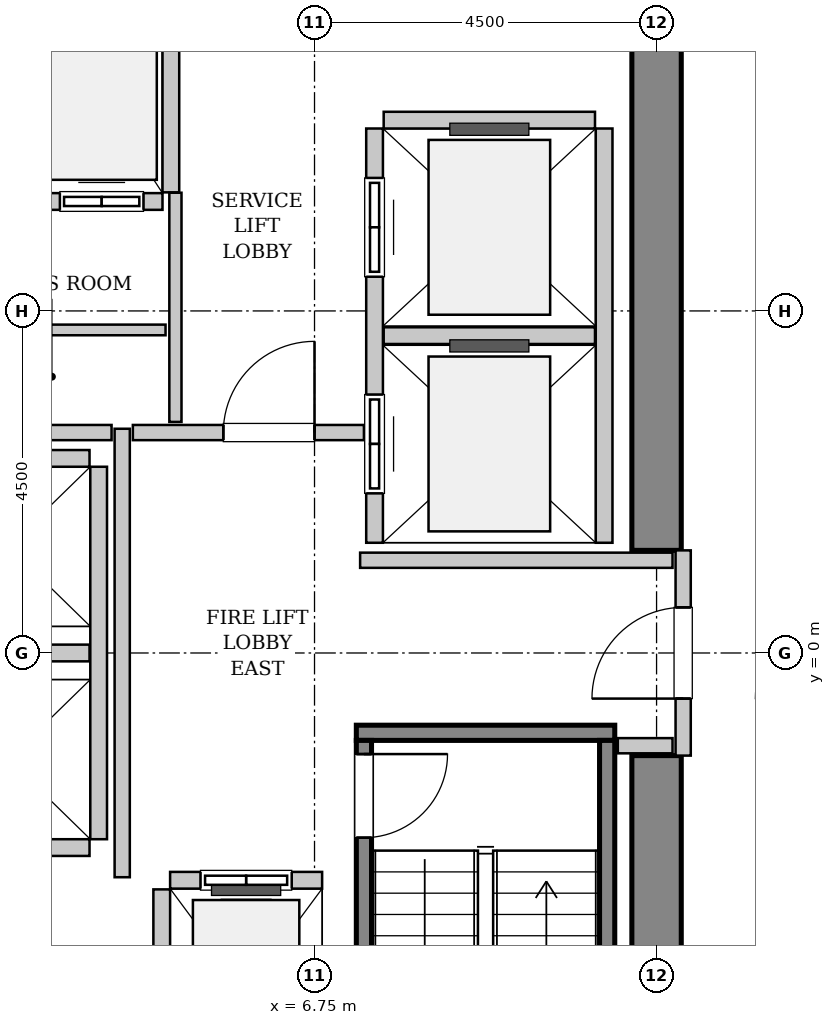
"""IFC4 building model, lengths in metres.
Left out: names, types, materials, properties, quantities, classifications, styles, units other than length and angle.
Written with IfcOpenShell. Run it as: python <this file> out.ifc"""

import sys

from ifc_helpers import new_model, si_unit, direction, frame, frame_2d, origin, place, context, subcontext, project, spatial, rectangle, extrude, source, transform, mapped, element, fill, save


model = new_model("IFC4")
c1 = context("Model", 3, precision=1e-05, world=origin(), true_north=direction((0.0, 1.0)))
c2 = subcontext(c1, "Body", "Model", "MODEL_VIEW")
j1 = project(units=[si_unit("LENGTHUNIT", "METRE"), si_unit("PLANEANGLEUNIT", "RADIAN")], contexts=[c1])
p1 = place(None, origin())
s1 = spatial("IfcSite", under=j1, at=p1, CompositionType="ELEMENT")
p2 = place(p1, origin())
s2 = spatial("IfcBuilding", under=s1, at=p2, CompositionType="ELEMENT")
p3 = place(p2, frame((0.0, 0.0, 86.2)))
s3 = spatial("IfcBuildingStorey", under=s2, at=p3, CompositionType="ELEMENT", Elevation=86.2)
m1 = source(origin(), c2, "Body", "SweptSolid", [
    extrude(rectangle(XDim=7.325, YDim=0.65, at=frame_2d((3.663, 0.0))), origin(), (0.0, 0.0, 1.0), 4.6),
])
for number, where, z_axis, x_axis in (
    (1, (11.25, -8.675, 0.0), (0.0, 0.0, 1.0), (0.0, 1.0, 0.0)),
    (2, (11.25, 1.35, 0.0), (0.0, 0.0, 1.0), (0.0, 1.0, 0.0)),
):
    element("IfcWall", number, at=place(p3, frame(where, z_axis=z_axis, x_axis=x_axis)), inside=s3, PredefinedType="SHEAR", context=c2, shape_type="MappedRepresentation", body=[
        mapped(m1, transform((0.0, 0.0, 0.0), x_axis=(1.0, 0.0, 0.0), y_axis=(0.0, 1.0, 0.0), z_axis=(0.0, 0.0, 1.0), scale=1.0)),
    ])
m2 = source(origin(), c2, "Body", "SweptSolid", [
    extrude(rectangle(XDim=3.4, YDim=0.2, at=frame_2d((1.7, 0.0))), origin(), (0.0, 0.0, 1.0), 4.6),
])
p4 = place(p3, frame((7.3, -1.05, 0.0), z_axis=(0.0, 0.0, 1.0), x_axis=(1.0, 0.0, 0.0)))
e3 = element("IfcWall", 3, at=p4, inside=s3, PredefinedType="SOLIDWALL", context=c2, shape_type="MappedRepresentation", body=[
    mapped(m2, transform((0.0, 0.0, 0.0), x_axis=(1.0, 0.0, 0.0), y_axis=(0.0, 1.0, 0.0), z_axis=(0.0, 0.0, 1.0), scale=1.0)),
])
m3 = source(origin(), c2, "Body", "SweptSolid", [
    extrude(rectangle(XDim=7.1, YDim=0.2, at=frame_2d((3.55, 0.0))), origin(), (0.0, 0.0, 1.0), 4.6),
])
p5 = place(p3, frame((7.4, -1.15, 0.0), z_axis=(0.0, 0.0, 1.0), x_axis=(0.0, -1.0, 0.0)))
e4 = element("IfcWall", 4, at=p5, inside=s3, PredefinedType="SOLIDWALL", context=c2, shape_type="MappedRepresentation", body=[
    mapped(m3, transform((0.0, 0.0, 0.0), x_axis=(1.0, 0.0, 0.0), y_axis=(0.0, 1.0, 0.0), z_axis=(0.0, 0.0, 1.0), scale=1.0)),
])
p6 = place(p5, frame((0.18, 0.0, 0.0)))
e5 = element("IfcOpeningElement", 5, at=p6, cuts=e4, PredefinedType="OPENING", context=c2, shape_type="SweptSolid", body=[
    extrude(rectangle(XDim=1.1, YDim=2.15, at=frame_2d((0.55, 1.075))), frame((0.0, 0.11, 0.0), z_axis=(0.0, -1.0, 0.0), x_axis=(1.0, 0.0, 0.0)), (0.0, 0.0, 1.0), 0.22),
])
p7 = place(p3, frame((10.6, -1.15, 0.0), z_axis=(0.0, 0.0, 1.0), x_axis=(0.0, -1.0, 0.0)))
e6 = element("IfcWall", 6, at=p7, inside=s3, PredefinedType="SOLIDWALL", context=c2, shape_type="MappedRepresentation", body=[
    mapped(m3, transform((0.0, 0.0, 0.0), x_axis=(1.0, 0.0, 0.0), y_axis=(0.0, 1.0, 0.0), z_axis=(0.0, 0.0, 1.0), scale=1.0)),
])
m4 = source(origin(), c2, "Body", "SweptSolid", [
    extrude(rectangle(XDim=2.0, YDim=0.22, at=frame_2d((1.0, 0.0))), origin(), (0.0, 0.0, 1.0), 4.335),
])
p8 = place(p3, frame((6.85, -2.99, 0.0), z_axis=(0.0, 0.0, 1.0), x_axis=(-1.0, 0.0, 0.0)))
e7 = element("IfcWall", 7, at=p8, inside=s3, PredefinedType="SOLIDWALL", context=c2, shape_type="MappedRepresentation", body=[
    mapped(m4, transform((0.0, 0.0, 0.0), x_axis=(1.0, 0.0, 0.0), y_axis=(0.0, 1.0, 0.0), z_axis=(0.0, 0.0, 1.0), scale=1.0)),
])
p9 = place(p8, frame((0.4, 0.0, 0.0)))
e8 = element("IfcOpeningElement", 8, at=p9, cuts=e7, PredefinedType="OPENING", context=c2, shape_type="SweptSolid", body=[
    extrude(rectangle(XDim=1.2, YDim=2.2, at=frame_2d((0.6, 1.1))), frame((0.0, 0.12, 0.0), z_axis=(0.0, -1.0, 0.0), x_axis=(1.0, 0.0, 0.0)), (0.0, 0.0, 1.0), 0.24),
])
m5 = source(origin(), c2, "Body", "SweptSolid", [
    extrude(rectangle(XDim=2.68, YDim=0.22, at=frame_2d((1.34, 0.0))), origin(), (0.0, 0.0, 1.0), 4.335),
])
p10 = place(p3, frame((4.74, -3.11, 0.0), z_axis=(0.0, 0.0, 1.0), x_axis=(0.0, -1.0, 0.0)))
e9 = element("IfcWall", 9, at=p10, inside=s3, PredefinedType="SOLIDWALL", context=c2, shape_type="MappedRepresentation", body=[
    mapped(m5, transform((0.0, 0.0, 0.0), x_axis=(1.0, 0.0, 0.0), y_axis=(0.0, 1.0, 0.0), z_axis=(0.0, 0.0, 1.0), scale=1.0)),
])
m6 = source(origin(), c2, "Body", "SweptSolid", [
    extrude(rectangle(XDim=5.45, YDim=0.22, at=frame_2d((2.725, 0.0))), origin(), (0.0, 0.0, 1.0), 4.335),
])
p11 = place(p3, frame((7.54, 6.9, 0.0), z_axis=(0.0, 0.0, 1.0), x_axis=(0.0, -1.0, 0.0)))
e10 = element("IfcWall", 10, at=p11, inside=s3, PredefinedType="SOLIDWALL", context=c2, shape_type="MappedRepresentation", body=[
    mapped(m6, transform((0.0, 0.0, 0.0), x_axis=(1.0, 0.0, 0.0), y_axis=(0.0, 1.0, 0.0), z_axis=(0.0, 0.0, 1.0), scale=1.0)),
])
p12 = place(p11, frame((3.5, 0.0, 0.0)))
e11 = element("IfcOpeningElement", 11, at=p12, cuts=e10, PredefinedType="OPENING", context=c2, shape_type="SweptSolid", body=[
    extrude(rectangle(XDim=1.3, YDim=2.3, at=frame_2d((0.65, 1.15))), frame((0.0, 0.12, 0.0), z_axis=(0.0, -1.0, 0.0), x_axis=(1.0, 0.0, 0.0)), (0.0, 0.0, 1.0), 0.24),
])
p13 = place(p11, frame((0.65, 0.0, 0.0)))
e12 = element("IfcOpeningElement", 12, at=p13, cuts=e10, PredefinedType="OPENING", context=c2, shape_type="SweptSolid", body=[
    extrude(rectangle(XDim=1.3, YDim=2.3, at=frame_2d((0.65, 1.15))), frame((0.0, 0.12, 0.0), z_axis=(0.0, -1.0, 0.0), x_axis=(1.0, 0.0, 0.0)), (0.0, 0.0, 1.0), 0.24),
])
p14 = place(p3, frame((10.56, 1.45, 0.0), z_axis=(0.0, 0.0, 1.0), x_axis=(0.0, 1.0, 0.0)))
e13 = element("IfcWall", 13, at=p14, inside=s3, PredefinedType="SOLIDWALL", context=c2, shape_type="MappedRepresentation", body=[
    mapped(m6, transform((0.0, 0.0, 0.0), x_axis=(1.0, 0.0, 0.0), y_axis=(0.0, 1.0, 0.0), z_axis=(0.0, 0.0, 1.0), scale=1.0)),
])
m7 = source(origin(), c2, "Body", "SweptSolid", [
    extrude(rectangle(XDim=2.78, YDim=0.22, at=frame_2d((1.39, 0.0))), origin(), (0.0, 0.0, 1.0), 4.335),
])
for number, where, z_axis, x_axis in (
    (14, (7.66, 4.175, 0.0), (0.0, 0.0, 1.0), (1.0, 0.0, 0.0)),
    (15, (10.44, 7.01, 0.0), (0.0, 0.0, 1.0), (-1.0, 0.0, 0.0)),
):
    element("IfcWall", number, at=place(p3, frame(where, z_axis=z_axis, x_axis=x_axis)), inside=s3, PredefinedType="SOLIDWALL", context=c2, shape_type="MappedRepresentation", body=[
        mapped(m7, transform((0.0, 0.0, 0.0), x_axis=(1.0, 0.0, 0.0), y_axis=(0.0, 1.0, 0.0), z_axis=(0.0, 0.0, 1.0), scale=1.0)),
    ])
m8 = source(origin(), c2, "Body", "SweptSolid", [
    extrude(rectangle(XDim=3.2, YDim=0.22, at=frame_2d((1.6, 0.0))), origin(), (0.0, 0.0, 1.0), 4.335),
])
p15 = place(p3, frame((1.55, 5.94, 0.0), z_axis=(0.0, 0.0, 1.0), x_axis=(1.0, 0.0, 0.0)))
e16 = element("IfcWall", 16, at=p15, inside=s3, PredefinedType="SOLIDWALL", context=c2, shape_type="MappedRepresentation", body=[
    mapped(m8, transform((0.0, 0.0, 0.0), x_axis=(1.0, 0.0, 0.0), y_axis=(0.0, 1.0, 0.0), z_axis=(0.0, 0.0, 1.0), scale=1.0)),
])
p16 = place(p15, frame((0.225, 0.0, 0.0)))
e17 = element("IfcOpeningElement", 17, at=p16, cuts=e16, PredefinedType="OPENING", context=c2, shape_type="SweptSolid", body=[
    extrude(rectangle(XDim=1.1, YDim=2.2, at=frame_2d((0.55, 1.1))), frame((0.0, 0.12, 0.0), z_axis=(0.0, -1.0, 0.0), x_axis=(1.0, 0.0, 0.0)), (0.0, 0.0, 1.0), 0.24),
])
p17 = place(p15, frame((1.85, 0.0, 0.0)))
e18 = element("IfcOpeningElement", 18, at=p17, cuts=e16, PredefinedType="OPENING", context=c2, shape_type="SweptSolid", body=[
    extrude(rectangle(XDim=1.1, YDim=2.2, at=frame_2d((0.55, 1.1))), frame((0.0, 0.12, 0.0), z_axis=(0.0, -1.0, 0.0), x_axis=(1.0, 0.0, 0.0)), (0.0, 0.0, 1.0), 0.24),
])
m9 = source(origin(), c2, "Body", "SweptSolid", [
    extrude(rectangle(XDim=2.43, YDim=0.22, at=frame_2d((1.215, 0.0))), origin(), (0.0, 0.0, 1.0), 4.335),
])
p18 = place(p3, frame((4.86, 6.06, 0.0), z_axis=(0.0, 0.0, 1.0), x_axis=(0.0, 1.0, 0.0)))
e19 = element("IfcWall", 19, at=p18, inside=s3, PredefinedType="SOLIDWALL", context=c2, shape_type="MappedRepresentation", body=[
    mapped(m9, transform((0.0, 0.0, 0.0), x_axis=(1.0, 0.0, 0.0), y_axis=(0.0, 1.0, 0.0), z_axis=(0.0, 0.0, 1.0), scale=1.0)),
])
m10 = source(origin(), c2, "Body", "SweptSolid", [
    extrude(rectangle(XDim=4.9, YDim=0.22, at=frame_2d((2.45, 0.0))), origin(), (0.0, 0.0, 1.0), 4.335),
])
p19 = place(p3, frame((3.91, -2.45, 0.0), z_axis=(0.0, 0.0, 1.0), x_axis=(0.0, 1.0, 0.0)))
e20 = element("IfcWall", 20, at=p19, inside=s3, PredefinedType="SOLIDWALL", context=c2, shape_type="MappedRepresentation", body=[
    mapped(m10, transform((0.0, 0.0, 0.0), x_axis=(1.0, 0.0, 0.0), y_axis=(0.0, 1.0, 0.0), z_axis=(0.0, 0.0, 1.0), scale=1.0)),
])
m11 = source(origin(), c2, "Body", "SweptSolid", [
    extrude(rectangle(XDim=2.13, YDim=0.22, at=frame_2d((1.065, 0.0))), origin(), (0.0, 0.0, 1.0), 4.335),
])
for number, where, z_axis, x_axis in (
    (21, (1.66, -2.56, 0.0), (0.0, 0.0, 1.0), (1.0, 0.0, 0.0)),
    (22, (1.66, 0.0, 0.0), (0.0, 0.0, 1.0), (1.0, 0.0, 0.0)),
    (23, (3.79, 2.56, 0.0), (0.0, 0.0, 1.0), (-1.0, 0.0, 0.0)),
):
    element("IfcWall", number, at=place(p3, frame(where, z_axis=z_axis, x_axis=x_axis)), inside=s3, PredefinedType="SOLIDWALL", context=c2, shape_type="MappedRepresentation", body=[
        mapped(m11, transform((0.0, 0.0, 0.0), x_axis=(1.0, 0.0, 0.0), y_axis=(0.0, 1.0, 0.0), z_axis=(0.0, 0.0, 1.0), scale=1.0)),
    ])
m12 = source(origin(), c2, "Body", "SweptSolid", [
    extrude(rectangle(XDim=2.7, YDim=0.2, at=frame_2d((1.35, 0.0))), origin(), (0.0, 0.0, 1.0), 3.225),
])
p20 = place(p3, frame((11.6, -1.35, 0.0), z_axis=(0.0, 0.0, 1.0), x_axis=(0.0, 1.0, 0.0)))
e24 = element("IfcWall", 24, at=p20, inside=s3, PredefinedType="PARTITIONING", context=c2, shape_type="MappedRepresentation", body=[
    mapped(m12, transform((0.0, 0.0, 0.0), x_axis=(1.0, 0.0, 0.0), y_axis=(0.0, 1.0, 0.0), z_axis=(0.0, 0.0, 1.0), scale=1.0)),
])
p21 = place(p20, frame((0.75, 0.0, 0.0)))
e25 = element("IfcOpeningElement", 25, at=p21, cuts=e24, PredefinedType="OPENING", context=c2, shape_type="SweptSolid", body=[
    extrude(rectangle(XDim=1.2, YDim=2.15, at=frame_2d((0.6, 1.075))), frame((0.0, 0.11, 0.0), z_axis=(0.0, -1.0, 0.0), x_axis=(1.0, 0.0, 0.0)), (0.0, 0.0, 1.0), 0.22),
])
m13 = source(origin(), c2, "Body", "SweptSolid", [
    extrude(rectangle(XDim=5.9, YDim=0.2, at=frame_2d((2.95, 0.0))), origin(), (0.0, 0.0, 1.0), 4.335),
])
p22 = place(p3, frame((4.22, -2.95, 0.0), z_axis=(0.0, 0.0, 1.0), x_axis=(0.0, 1.0, 0.0)))
e26 = element("IfcWall", 26, at=p22, inside=s3, PredefinedType="PARTITIONING", context=c2, shape_type="MappedRepresentation", body=[
    mapped(m13, transform((0.0, 0.0, 0.0), x_axis=(1.0, 0.0, 0.0), y_axis=(0.0, 1.0, 0.0), z_axis=(0.0, 0.0, 1.0), scale=1.0)),
])
m14 = source(origin(), c2, "Body", "SweptSolid", [
    extrude(rectangle(XDim=2.52, YDim=0.2, at=frame_2d((1.26, 0.0))), origin(), (0.0, 0.0, 1.0), 4.335),
])
p23 = place(p3, frame((1.56, 2.9, 0.0), z_axis=(0.0, 0.0, 1.0), x_axis=(1.0, 0.0, 0.0)))
e27 = element("IfcWall", 27, at=p23, inside=s3, PredefinedType="PARTITIONING", context=c2, shape_type="MappedRepresentation", body=[
    mapped(m14, transform((0.0, 0.0, 0.0), x_axis=(1.0, 0.0, 0.0), y_axis=(0.0, 1.0, 0.0), z_axis=(0.0, 0.0, 1.0), scale=1.0)),
])
m15 = source(origin(), c2, "Body", "SweptSolid", [
    extrude(rectangle(XDim=3.04, YDim=0.2, at=frame_2d((1.52, 0.0))), origin(), (0.0, 0.0, 1.0), 4.335),
])
p24 = place(p3, frame((4.36, 2.9, 0.0), z_axis=(0.0, 0.0, 1.0), x_axis=(1.0, 0.0, 0.0)))
e28 = element("IfcWall", 28, at=p24, inside=s3, PredefinedType="PARTITIONING", context=c2, shape_type="MappedRepresentation", body=[
    mapped(m15, transform((0.0, 0.0, 0.0), x_axis=(1.0, 0.0, 0.0), y_axis=(0.0, 1.0, 0.0), z_axis=(0.0, 0.0, 1.0), scale=1.0)),
])
p25 = place(p24, frame((1.19, 0.0, 0.0)))
e29 = element("IfcOpeningElement", 29, at=p25, cuts=e28, PredefinedType="OPENING", context=c2, shape_type="SweptSolid", body=[
    extrude(rectangle(XDim=1.2, YDim=2.15, at=frame_2d((0.6, 1.075))), frame((0.0, 0.11, 0.0), z_axis=(0.0, -1.0, 0.0), x_axis=(1.0, 0.0, 0.0)), (0.0, 0.0, 1.0), 0.22),
])
m16 = source(origin(), c2, "Body", "SweptSolid", [
    extrude(rectangle(XDim=4.11, YDim=0.2, at=frame_2d((2.055, 0.0))), origin(), (0.0, 0.0, 1.0), 4.335),
])
p26 = place(p3, frame((7.35, 1.22, 0.0), z_axis=(0.0, 0.0, 1.0), x_axis=(1.0, 0.0, 0.0)))
e30 = element("IfcWall", 30, at=p26, inside=s3, PredefinedType="PARTITIONING", context=c2, shape_type="MappedRepresentation", body=[
    mapped(m16, transform((0.0, 0.0, 0.0), x_axis=(1.0, 0.0, 0.0), y_axis=(0.0, 1.0, 0.0), z_axis=(0.0, 0.0, 1.0), scale=1.0)),
])
m17 = source(origin(), c2, "Body", "SweptSolid", [
    extrude(rectangle(XDim=0.72, YDim=0.2, at=frame_2d((0.36, 0.0))), origin(), (0.0, 0.0, 1.0), 4.335),
])
p27 = place(p3, frame((10.74, -1.22, 0.0), z_axis=(0.0, 0.0, 1.0), x_axis=(1.0, 0.0, 0.0)))
e31 = element("IfcWall", 31, at=p27, inside=s3, PredefinedType="PARTITIONING", context=c2, shape_type="MappedRepresentation", body=[
    mapped(m17, transform((0.0, 0.0, 0.0), x_axis=(1.0, 0.0, 0.0), y_axis=(0.0, 1.0, 0.0), z_axis=(0.0, 0.0, 1.0), scale=1.0)),
])
m18 = source(origin(), c2, "Body", "SweptSolid", [
    extrude(rectangle(XDim=3.015, YDim=0.16, at=frame_2d((1.507, 0.0))), origin(), (0.0, 0.0, 1.0), 4.335),
])
p28 = place(p3, frame((4.92, 3.04, 0.0), z_axis=(0.0, 0.0, 1.0), x_axis=(0.0, 1.0, 0.0)))
e32 = element("IfcWall", 32, at=p28, inside=s3, PredefinedType="PARTITIONING", context=c2, shape_type="MappedRepresentation", body=[
    mapped(m18, transform((0.0, 0.0, 0.0), x_axis=(1.0, 0.0, 0.0), y_axis=(0.0, 1.0, 0.0), z_axis=(0.0, 0.0, 1.0), scale=1.0)),
])
m19 = source(origin(), c2, "Body", "SweptSolid", [
    extrude(rectangle(XDim=3.15, YDim=0.14, at=frame_2d((1.575, 0.0))), origin(), (0.0, 0.0, 1.0), 4.335),
])
p29 = place(p3, frame((1.64, 4.25, 0.0), z_axis=(0.0, 0.0, 1.0), x_axis=(1.0, 0.0, 0.0)))
e33 = element("IfcWall", 33, at=p29, inside=s3, PredefinedType="PARTITIONING", context=c2, shape_type="MappedRepresentation", body=[
    mapped(m19, transform((0.0, 0.0, 0.0), x_axis=(1.0, 0.0, 0.0), y_axis=(0.0, 1.0, 0.0), z_axis=(0.0, 0.0, 1.0), scale=1.0)),
])
m20 = source(origin(), c2, "Body", "SweptSolid", [
    extrude(rectangle(XDim=1.1, YDim=2.15, at=frame_2d((0.55, 1.075))), frame((0.0, 0.025, 0.0), z_axis=(0.0, -1.0, 0.0), x_axis=(1.0, 0.0, 0.0)), (0.0, 0.0, 1.0), 0.05),
])
p30 = place(p6, origin())
e34 = element("IfcDoor", 34, at=p30, inside=s3, OperationType="SINGLE_SWING_LEFT", PredefinedType="DOOR", context=c2, shape_type="MappedRepresentation", body=[
    mapped(m20, transform((0.0, 0.0, 0.0), x_axis=(1.0, 0.0, 0.0), y_axis=(0.0, 1.0, 0.0), z_axis=(0.0, 0.0, 1.0), scale=1.0)),
])
fill(e5, e34)
m21 = source(origin(), c2, "Body", "SweptSolid", [
    extrude(rectangle(XDim=1.2, YDim=2.2, at=frame_2d((0.6, 1.1))), frame((0.0, 0.025, 0.0), z_axis=(0.0, -1.0, 0.0), x_axis=(1.0, 0.0, 0.0)), (0.0, 0.0, 1.0), 0.05),
])
p31 = place(p9, origin())
e35 = element("IfcDoor", 35, at=p31, inside=s3, OperationType="SLIDING_TO_LEFT", PredefinedType="DOOR", context=c2, shape_type="MappedRepresentation", body=[
    mapped(m21, transform((0.0, 0.0, 0.0), x_axis=(1.0, 0.0, 0.0), y_axis=(0.0, 1.0, 0.0), z_axis=(0.0, 0.0, 1.0), scale=1.0)),
])
fill(e8, e35)
m22 = source(origin(), c2, "Body", "SweptSolid", [
    extrude(rectangle(XDim=1.3, YDim=2.3, at=frame_2d((0.65, 1.15))), frame((0.0, 0.025, 0.0), z_axis=(0.0, -1.0, 0.0), x_axis=(1.0, 0.0, 0.0)), (0.0, 0.0, 1.0), 0.05),
])
p32 = place(p12, origin())
e36 = element("IfcDoor", 36, at=p32, inside=s3, OperationType="SLIDING_TO_RIGHT", PredefinedType="DOOR", context=c2, shape_type="MappedRepresentation", body=[
    mapped(m22, transform((0.0, 0.0, 0.0), x_axis=(1.0, 0.0, 0.0), y_axis=(0.0, 1.0, 0.0), z_axis=(0.0, 0.0, 1.0), scale=1.0)),
])
fill(e11, e36)
p33 = place(p13, origin())
e37 = element("IfcDoor", 37, at=p33, inside=s3, OperationType="SLIDING_TO_RIGHT", PredefinedType="DOOR", context=c2, shape_type="MappedRepresentation", body=[
    mapped(m22, transform((0.0, 0.0, 0.0), x_axis=(1.0, 0.0, 0.0), y_axis=(0.0, 1.0, 0.0), z_axis=(0.0, 0.0, 1.0), scale=1.0)),
])
fill(e12, e37)
m23 = source(origin(), c2, "Body", "SweptSolid", [
    extrude(rectangle(XDim=1.1, YDim=2.2, at=frame_2d((0.55, 1.1))), frame((0.0, 0.025, 0.0), z_axis=(0.0, -1.0, 0.0), x_axis=(1.0, 0.0, 0.0)), (0.0, 0.0, 1.0), 0.05),
])
p34 = place(p17, origin())
e38 = element("IfcDoor", 38, at=p34, inside=s3, OperationType="DOUBLE_DOOR_SLIDING", PredefinedType="DOOR", context=c2, shape_type="MappedRepresentation", body=[
    mapped(m23, transform((0.0, 0.0, 0.0), x_axis=(1.0, 0.0, 0.0), y_axis=(0.0, 1.0, 0.0), z_axis=(0.0, 0.0, 1.0), scale=1.0)),
])
fill(e18, e38)
m24 = source(origin(), c2, "Body", "SweptSolid", [
    extrude(rectangle(XDim=1.2, YDim=2.15, at=frame_2d((0.6, 1.075))), frame((0.0, 0.025, 0.0), z_axis=(0.0, -1.0, 0.0), x_axis=(1.0, 0.0, 0.0)), (0.0, 0.0, 1.0), 0.05),
])
p35 = place(p21, origin())
e39 = element("IfcDoor", 39, at=p35, inside=s3, OperationType="SINGLE_SWING_LEFT", PredefinedType="DOOR", context=c2, shape_type="MappedRepresentation", body=[
    mapped(m24, transform((0.0, 0.0, 0.0), x_axis=(1.0, 0.0, 0.0), y_axis=(0.0, 1.0, 0.0), z_axis=(0.0, 0.0, 1.0), scale=1.0)),
])
fill(e25, e39)
p36 = place(p25, origin())
e40 = element("IfcDoor", 40, at=p36, inside=s3, OperationType="SINGLE_SWING_RIGHT", PredefinedType="DOOR", context=c2, shape_type="MappedRepresentation", body=[
    mapped(m24, transform((0.0, 0.0, 0.0), x_axis=(1.0, 0.0, 0.0), y_axis=(0.0, 1.0, 0.0), z_axis=(0.0, 0.0, 1.0), scale=1.0)),
])
fill(e29, e40)
save(model, sys.argv[1])
